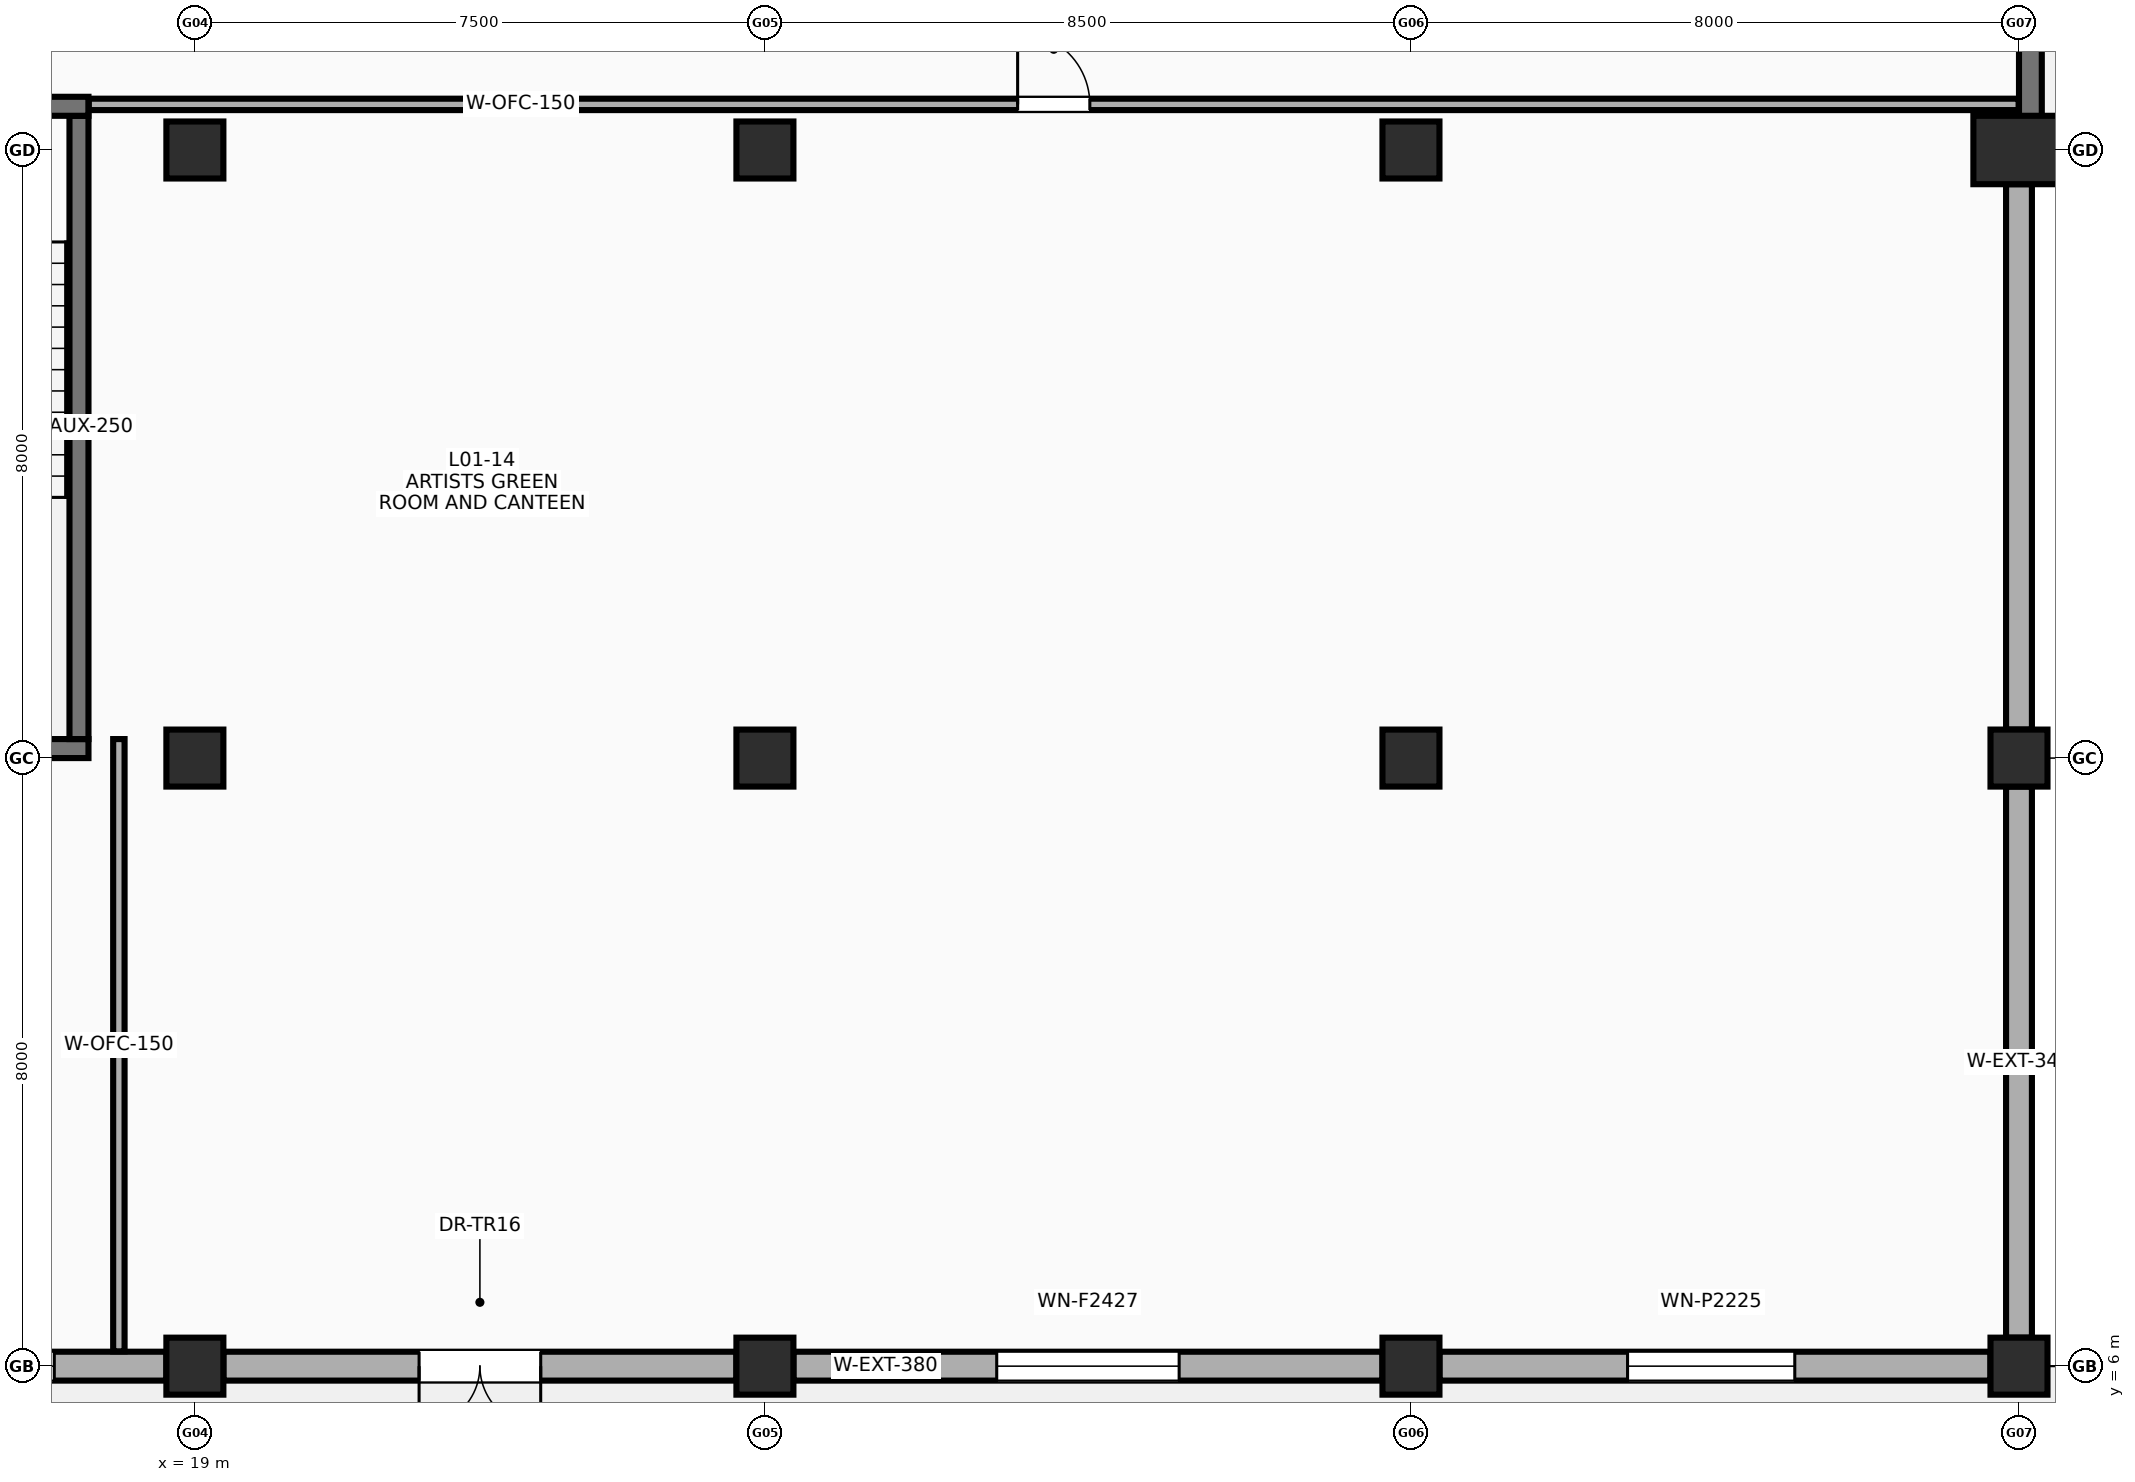
"""IFC4 building model, lengths in metres.
Left out: names, types, materials, properties, quantities, classifications, styles, units other than length and angle.
Written with IfcOpenShell. Run it as: python <this file> out.ifc"""

import sys

from ifc_helpers import new_model, si_unit, direction, frame, frame_2d, origin, origin_2d, place, context, subcontext, project, spatial, rectangle, extrude, element, fill, save


model = new_model("IFC4")
c1 = context("Model", 3, precision=1e-05, world=origin(), true_north=direction((0.0, 1.0)))
c2 = subcontext(c1, "Body", "Model", "MODEL_VIEW")
j1 = project(units=[si_unit("LENGTHUNIT", "METRE"), si_unit("PLANEANGLEUNIT", "RADIAN")], contexts=[c1])
p1 = place(None, origin())
s1 = spatial("IfcSite", under=j1, at=p1, CompositionType="ELEMENT")
p2 = place(p1, origin())
s2 = spatial("IfcBuilding", under=s1, at=p2, CompositionType="ELEMENT")
p3 = place(p2, frame((0.0, 0.0, 5.4)))
s3 = spatial("IfcBuildingStorey", under=s2, at=p3, CompositionType="ELEMENT", Elevation=5.4)
for number, where, z_axis, x_axis in (
    (1, (19.0, 6.0, 0.0), (0.0, 0.0, 1.0), (1.0, 0.0, 0.0)),
    (2, (19.0, 14.0, 0.0), (0.0, 0.0, 1.0), (1.0, 0.0, 0.0)),
    (3, (19.0, 22.0, 0.0), (0.0, 0.0, 1.0), (1.0, 0.0, 0.0)),
    (4, (26.5, 6.0, 0.0), (0.0, 0.0, 1.0), (1.0, 0.0, 0.0)),
    (5, (26.5, 14.0, 0.0), (0.0, 0.0, 1.0), (1.0, 0.0, 0.0)),
    (6, (26.5, 22.0, 0.0), (0.0, 0.0, 1.0), (1.0, 0.0, 0.0)),
    (7, (35.0, 6.0, 0.0), (0.0, 0.0, 1.0), (1.0, 0.0, 0.0)),
    (8, (35.0, 14.0, 0.0), (0.0, 0.0, 1.0), (1.0, 0.0, 0.0)),
    (9, (35.0, 22.0, 0.0), (0.0, 0.0, 1.0), (1.0, 0.0, 0.0)),
    (10, (43.0, 6.0, 0.0), (0.0, 0.0, 1.0), (1.0, 0.0, 0.0)),
    (11, (43.0, 14.0, 0.0), (0.0, 0.0, 1.0), (1.0, 0.0, 0.0)),
):
    element("IfcColumn", number, at=place(p3, frame(where, z_axis=z_axis, x_axis=x_axis)), inside=s3, PredefinedType="COLUMN", context=c2, shape_type="SweptSolid", body=[
        extrude(rectangle(XDim=0.75, YDim=0.75, at=origin_2d()), origin(), (0.0, 0.0, 1.0), 4.4),
    ])
p4 = place(p3, frame((43.0, 22.0, 0.0), z_axis=(0.0, 0.0, 1.0), x_axis=(1.0, 0.0, 0.0)))
e12 = element("IfcColumn", 12, at=p4, inside=s3, PredefinedType="COLUMN", context=c2, shape_type="SweptSolid", body=[
    extrude(rectangle(XDim=1.2, YDim=0.9, at=origin_2d()), origin(), (0.0, 0.0, 1.0), 4.4),
])
p5 = place(p3, frame((43.0, 22.15, 0.0), z_axis=(0.0, 0.0, 1.0), x_axis=(1.0, 0.0, 0.0)))
e13 = element("IfcWall", 13, at=p5, inside=s3, PredefinedType="SHEAR", context=c2, shape_type="SweptSolid", body=[
    extrude(rectangle(XDim=7.5, YDim=0.3, at=frame_2d((3.75, 0.0))), origin(), (0.0, 0.0, 1.0), 4.4),
])
p6 = place(p3, frame((43.15, 22.3, 0.0), z_axis=(0.0, 0.0, 1.0), x_axis=(0.0, 1.0, 0.0)))
e14 = element("IfcWall", 14, at=p6, inside=s3, PredefinedType="SHEAR", context=c2, shape_type="SweptSolid", body=[
    extrude(rectangle(XDim=8.2, YDim=0.3, at=frame_2d((4.1, 0.0))), origin(), (0.0, 0.0, 1.0), 4.4),
])
p7 = place(p3, frame((13.875, 6.0, 0.0), z_axis=(0.0, 0.0, 1.0), x_axis=(1.0, 0.0, 0.0)))
e15 = element("IfcWall", 15, at=p7, inside=s3, PredefinedType="SOLIDWALL", context=c2, shape_type="SweptSolid", body=[
    extrude(rectangle(XDim=4.75, YDim=0.38, at=frame_2d((2.375, 0.0))), origin(), (0.0, 0.0, 1.0), 3.2),
])
p8 = place(p7, frame((1.475, 0.0, 0.82)))
e16 = element("IfcOpeningElement", 16, at=p8, cuts=e15, PredefinedType="OPENING", context=c2, shape_type="SweptSolid", body=[
    extrude(rectangle(XDim=1.8, YDim=2.2, at=frame_2d((0.9, 1.1))), frame((0.0, 0.2, 0.0), z_axis=(0.0, -1.0, 0.0), x_axis=(1.0, 0.0, 0.0)), (0.0, 0.0, 1.0), 0.4),
])
p9 = place(p3, frame((19.375, 6.0, 0.0), z_axis=(0.0, 0.0, 1.0), x_axis=(1.0, 0.0, 0.0)))
e17 = element("IfcWall", 17, at=p9, inside=s3, PredefinedType="SOLIDWALL", context=c2, shape_type="SweptSolid", body=[
    extrude(rectangle(XDim=6.75, YDim=0.38, at=frame_2d((3.375, 0.0))), origin(), (0.0, 0.0, 1.0), 3.2),
])
p10 = place(p9, frame((4.175, 0.0, 0.0), z_axis=(0.0, 0.0, 1.0), x_axis=(-1.0, 0.0, 0.0)))
e18 = element("IfcOpeningElement", 18, at=p10, cuts=e17, PredefinedType="OPENING", context=c2, shape_type="SweptSolid", body=[
    extrude(rectangle(XDim=1.6, YDim=2.3, at=frame_2d((0.8, 1.15))), frame((0.0, 0.2, 0.0), z_axis=(0.0, -1.0, 0.0), x_axis=(1.0, 0.0, 0.0)), (0.0, 0.0, 1.0), 0.4),
])
p11 = place(p3, frame((26.875, 6.0, 0.0), z_axis=(0.0, 0.0, 1.0), x_axis=(1.0, 0.0, 0.0)))
e19 = element("IfcWall", 19, at=p11, inside=s3, PredefinedType="SOLIDWALL", context=c2, shape_type="SweptSolid", body=[
    extrude(rectangle(XDim=7.75, YDim=0.38, at=frame_2d((3.875, 0.0))), origin(), (0.0, 0.0, 1.0), 3.2),
])
p12 = place(p11, frame((2.675, 0.0, 0.32)))
e20 = element("IfcOpeningElement", 20, at=p12, cuts=e19, PredefinedType="OPENING", context=c2, shape_type="SweptSolid", body=[
    extrude(rectangle(XDim=2.4, YDim=2.7, at=frame_2d((1.2, 1.35))), frame((0.0, 0.2, 0.0), z_axis=(0.0, -1.0, 0.0), x_axis=(1.0, 0.0, 0.0)), (0.0, 0.0, 1.0), 0.4),
])
p13 = place(p3, frame((35.375, 6.0, 0.0), z_axis=(0.0, 0.0, 1.0), x_axis=(1.0, 0.0, 0.0)))
e21 = element("IfcWall", 21, at=p13, inside=s3, PredefinedType="SOLIDWALL", context=c2, shape_type="SweptSolid", body=[
    extrude(rectangle(XDim=7.25, YDim=0.38, at=frame_2d((3.625, 0.0))), origin(), (0.0, 0.0, 1.0), 3.2),
])
p14 = place(p13, frame((2.475, 0.0, 0.52)))
e22 = element("IfcOpeningElement", 22, at=p14, cuts=e21, PredefinedType="OPENING", context=c2, shape_type="SweptSolid", body=[
    extrude(rectangle(XDim=2.2, YDim=2.5, at=frame_2d((1.1, 1.25))), frame((0.0, 0.2, 0.0), z_axis=(0.0, -1.0, 0.0), x_axis=(1.0, 0.0, 0.0)), (0.0, 0.0, 1.0), 0.4),
])
p15 = place(p3, frame((43.0, 6.375, 0.0), z_axis=(0.0, 0.0, 1.0), x_axis=(0.0, 1.0, 0.0)))
e23 = element("IfcWall", 23, at=p15, inside=s3, PredefinedType="SOLIDWALL", context=c2, shape_type="SweptSolid", body=[
    extrude(rectangle(XDim=7.25, YDim=0.34, at=frame_2d((3.625, 0.0))), origin(), (0.0, 0.0, 1.0), 3.2),
])
p16 = place(p3, frame((43.0, 14.375, 0.0), z_axis=(0.0, 0.0, 1.0), x_axis=(0.0, 1.0, 0.0)))
e24 = element("IfcWall", 24, at=p16, inside=s3, PredefinedType="SOLIDWALL", context=c2, shape_type="SweptSolid", body=[
    extrude(rectangle(XDim=7.175, YDim=0.34, at=frame_2d((3.587, 0.0))), origin(), (0.0, 0.0, 1.0), 3.2),
])
p17 = place(p3, frame((13.5, 14.125, 0.0), z_axis=(0.0, 0.0, 1.0), x_axis=(1.0, 0.0, 0.0)))
e25 = element("IfcWall", 25, at=p17, inside=s3, PredefinedType="SHEAR", context=c2, shape_type="SweptSolid", body=[
    extrude(rectangle(XDim=4.1, YDim=0.25, at=frame_2d((2.05, 0.0))), origin(), (0.0, 0.0, 1.0), 4.4),
])
p18 = place(p3, frame((17.475, 14.25, 0.0), z_axis=(0.0, 0.0, 1.0), x_axis=(0.0, 1.0, 0.0)))
e26 = element("IfcWall", 26, at=p18, inside=s3, PredefinedType="SHEAR", context=c2, shape_type="SweptSolid", body=[
    extrude(rectangle(XDim=8.2, YDim=0.25, at=frame_2d((4.1, 0.0))), origin(), (0.0, 0.0, 1.0), 4.4),
])
p19 = place(p3, frame((13.5, 22.575, 0.0), z_axis=(0.0, 0.0, 1.0), x_axis=(1.0, 0.0, 0.0)))
e27 = element("IfcWall", 27, at=p19, inside=s3, PredefinedType="SHEAR", context=c2, shape_type="SweptSolid", body=[
    extrude(rectangle(XDim=4.1, YDim=0.25, at=frame_2d((2.05, 0.0))), origin(), (0.0, 0.0, 1.0), 4.4),
])
p20 = place(p19, frame((1.45, 0.0, 0.0)))
e28 = element("IfcOpeningElement", 28, at=p20, cuts=e27, PredefinedType="OPENING", context=c2, shape_type="SweptSolid", body=[
    extrude(rectangle(XDim=1.2, YDim=2.15, at=frame_2d((0.6, 1.075))), frame((0.0, 0.135, 0.0), z_axis=(0.0, -1.0, 0.0), x_axis=(1.0, 0.0, 0.0)), (0.0, 0.0, 1.0), 0.27),
])
p21 = place(p3, frame((17.605, 22.6, 0.0), z_axis=(0.0, 0.0, 1.0), x_axis=(1.0, 0.0, 0.0)))
e29 = element("IfcWall", 29, at=p21, inside=s3, PredefinedType="PARTITIONING", context=c2, shape_type="SweptSolid", body=[
    extrude(rectangle(XDim=25.39, YDim=0.15, at=frame_2d((12.695, 0.0))), origin(), (0.0, 0.0, 1.0), 3.5),
])
p22 = place(p21, frame((12.22, 0.0, 0.0)))
e30 = element("IfcOpeningElement", 30, at=p22, cuts=e29, PredefinedType="OPENING", context=c2, shape_type="SweptSolid", body=[
    extrude(rectangle(XDim=0.95, YDim=2.15, at=frame_2d((0.475, 1.075))), frame((0.0, 0.085, 0.0), z_axis=(0.0, -1.0, 0.0), x_axis=(1.0, 0.0, 0.0)), (0.0, 0.0, 1.0), 0.17),
])
p23 = place(p3, frame((18.0, 6.195, 0.0), z_axis=(0.0, 0.0, 1.0), x_axis=(0.0, 1.0, 0.0)))
e31 = element("IfcWall", 31, at=p23, inside=s3, PredefinedType="PARTITIONING", context=c2, shape_type="SweptSolid", body=[
    extrude(rectangle(XDim=8.055, YDim=0.15, at=frame_2d((4.027, 0.0))), origin(), (0.0, 0.0, 1.0), 3.1),
])
p24 = place(p8, origin())
e32 = element("IfcWindow", 32, at=p24, inside=s3, PartitioningType="SINGLE_PANEL", PredefinedType="WINDOW", context=c2, shape_type="SweptSolid", body=[
    extrude(rectangle(XDim=1.8, YDim=2.2, at=frame_2d((0.9, 1.1))), frame((0.0, 0.03, 0.0), z_axis=(0.0, -1.0, 0.0), x_axis=(1.0, 0.0, 0.0)), (0.0, 0.0, 1.0), 0.06),
])
fill(e16, e32)
p25 = place(p10, origin())
e33 = element("IfcDoor", 33, at=p25, inside=s3, OperationType="DOUBLE_DOOR_SINGLE_SWING", PredefinedType="DOOR", context=c2, shape_type="SweptSolid", body=[
    extrude(rectangle(XDim=1.6, YDim=2.3, at=frame_2d((0.8, 1.15))), frame((0.0, 0.025, 0.0), z_axis=(0.0, -1.0, 0.0), x_axis=(1.0, 0.0, 0.0)), (0.0, 0.0, 1.0), 0.05),
])
fill(e18, e33)
p26 = place(p12, origin())
e34 = element("IfcWindow", 34, at=p26, inside=s3, PartitioningType="SINGLE_PANEL", PredefinedType="WINDOW", context=c2, shape_type="SweptSolid", body=[
    extrude(rectangle(XDim=2.4, YDim=2.7, at=frame_2d((1.2, 1.35))), frame((0.0, 0.03, 0.0), z_axis=(0.0, -1.0, 0.0), x_axis=(1.0, 0.0, 0.0)), (0.0, 0.0, 1.0), 0.06),
])
fill(e20, e34)
p27 = place(p14, origin())
e35 = element("IfcWindow", 35, at=p27, inside=s3, PartitioningType="SINGLE_PANEL", PredefinedType="WINDOW", context=c2, shape_type="SweptSolid", body=[
    extrude(rectangle(XDim=2.2, YDim=2.5, at=frame_2d((1.1, 1.25))), frame((0.0, 0.03, 0.0), z_axis=(0.0, -1.0, 0.0), x_axis=(1.0, 0.0, 0.0)), (0.0, 0.0, 1.0), 0.06),
])
fill(e22, e35)
p28 = place(p22, origin())
e36 = element("IfcDoor", 36, at=p28, inside=s3, OperationType="SINGLE_SWING_LEFT", PredefinedType="DOOR", context=c2, shape_type="SweptSolid", body=[
    extrude(rectangle(XDim=0.95, YDim=2.15, at=frame_2d((0.475, 1.075))), frame((0.0, 0.025, 0.0), z_axis=(0.0, -1.0, 0.0), x_axis=(1.0, 0.0, 0.0)), (0.0, 0.0, 1.0), 0.05),
])
fill(e30, e36)
save(model, sys.argv[1])
